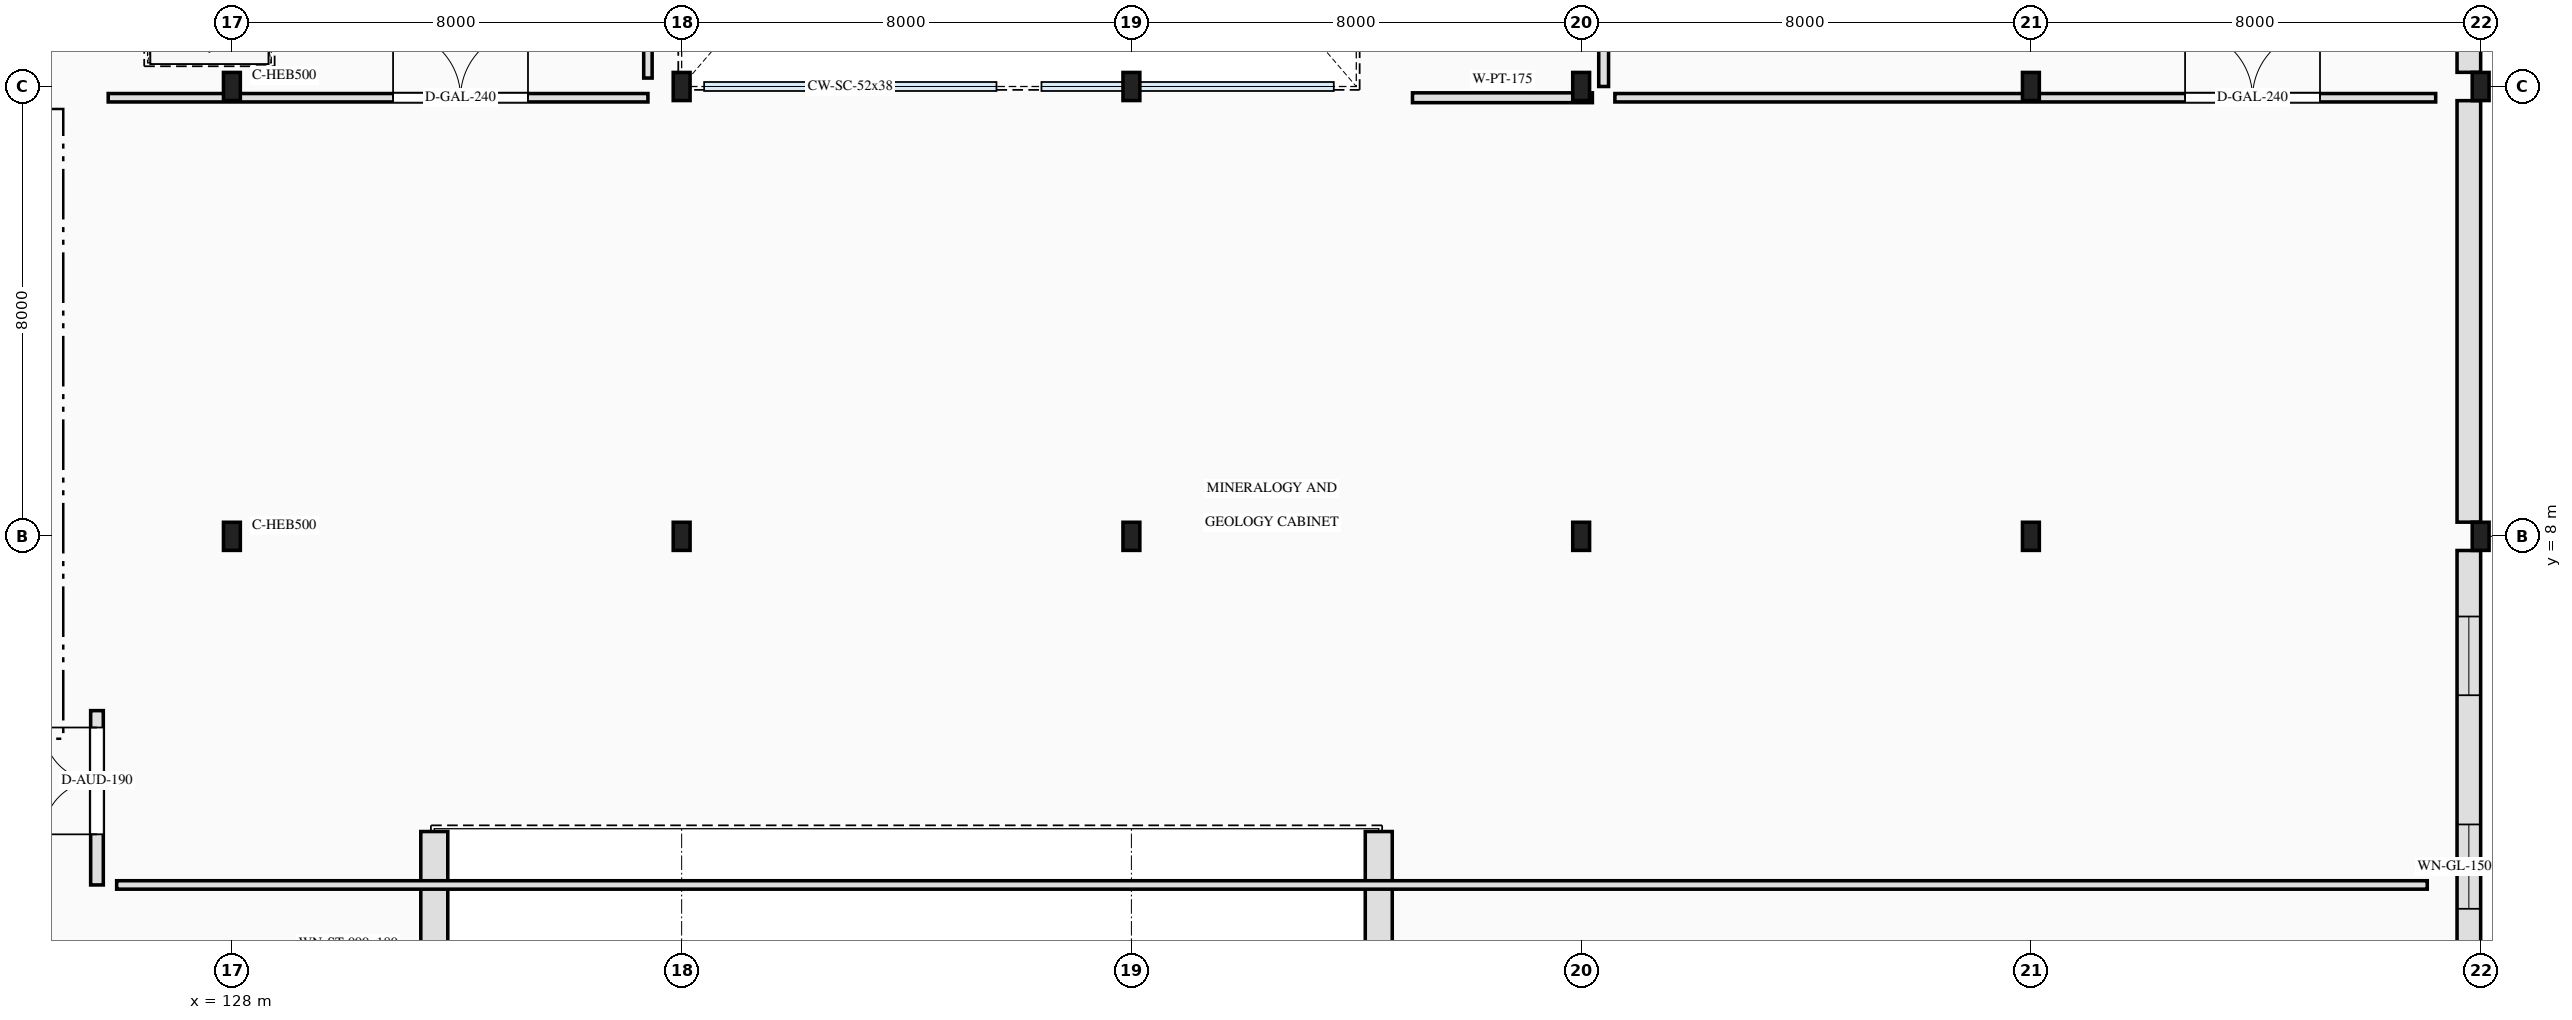
"""IFC4 building model, lengths in metres.
Left out: names, types, materials, properties, quantities, classifications, styles, units other than length and angle.
Written with IfcOpenShell. Run it as: python <this file> out.ifc"""

import sys

from ifc_helpers import new_model, si_unit, direction, frame, frame_2d, origin, origin_2d, place, context, subcontext, project, spatial, rectangle, i_section, extrude, element, fill, save


model = new_model("IFC4")
c1 = context("Model", 3, precision=1e-05, world=origin(), true_north=direction((0.0, 1.0)))
c2 = subcontext(c1, "Body", "Model", "MODEL_VIEW")
j1 = project(units=[si_unit("LENGTHUNIT", "METRE"), si_unit("PLANEANGLEUNIT", "RADIAN")], contexts=[c1])
p1 = place(None, origin())
s1 = spatial("IfcSite", under=j1, at=p1, CompositionType="ELEMENT")
p2 = place(p1, origin())
s2 = spatial("IfcBuilding", under=s1, at=p2, CompositionType="ELEMENT")
p3 = place(p2, frame((0.0, 0.0, 5.4)))
s3 = spatial("IfcBuildingStorey", under=s2, at=p3, CompositionType="ELEMENT", Elevation=5.4)
for number, where, z_axis, x_axis in (
    (1, (128.0, 8.0, 0.0), (0.0, 0.0, 1.0), (1.0, 0.0, 0.0)),
    (2, (128.0, 16.0, 0.0), (0.0, 0.0, 1.0), (1.0, 0.0, 0.0)),
    (3, (136.0, 8.0, 0.0), (0.0, 0.0, 1.0), (1.0, 0.0, 0.0)),
    (4, (136.0, 16.0, 0.0), (0.0, 0.0, 1.0), (1.0, 0.0, 0.0)),
    (5, (144.0, 8.0, 0.0), (0.0, 0.0, 1.0), (1.0, 0.0, 0.0)),
    (6, (144.0, 16.0, 0.0), (0.0, 0.0, 1.0), (1.0, 0.0, 0.0)),
    (7, (152.0, 8.0, 0.0), (0.0, 0.0, 1.0), (1.0, 0.0, 0.0)),
    (8, (152.0, 16.0, 0.0), (0.0, 0.0, 1.0), (1.0, 0.0, 0.0)),
    (9, (160.0, 8.0, 0.0), (0.0, 0.0, 1.0), (1.0, 0.0, 0.0)),
    (10, (160.0, 16.0, 0.0), (0.0, 0.0, 1.0), (1.0, 0.0, 0.0)),
    (11, (168.0, 8.0, 0.0), (0.0, 0.0, 1.0), (1.0, 0.0, 0.0)),
    (12, (168.0, 16.0, 0.0), (0.0, 0.0, 1.0), (1.0, 0.0, 0.0)),
):
    element("IfcColumn", number, at=place(p3, frame(where, z_axis=z_axis, x_axis=x_axis)), inside=s3, PredefinedType="COLUMN", context=c2, shape_type="SweptSolid", body=[
        extrude(i_section(OverallWidth=0.3, OverallDepth=0.5, WebThickness=0.014, FlangeThickness=0.028, FilletRadius=0.027, at=origin_2d()), origin(), (0.0, 0.0, 1.0), 4.2),
    ])
for number, where, z_axis, x_axis in (
    (13, (131.6, 0.24, 0.0), (0.0, 0.0, 1.0), (0.0, 1.0, 0.0)),
    (14, (148.4, 0.24, 0.0), (0.0, 0.0, 1.0), (0.0, 1.0, 0.0)),
):
    element("IfcWall", number, at=place(p3, frame(where, z_axis=z_axis, x_axis=x_axis)), inside=s3, PredefinedType="SOLIDWALL", context=c2, shape_type="SweptSolid", body=[
        extrude(rectangle(XDim=2.51, YDim=0.48, at=frame_2d((1.255, 0.0))), origin(), (0.0, 0.0, 1.0), 3.96),
    ])
p4 = place(p3, frame((167.79, 7.748, 0.0), z_axis=(0.0, 0.0, 1.0), x_axis=(0.0, -1.0, 0.0)))
e15 = element("IfcWall", 15, at=p4, inside=s3, PredefinedType="SOLIDWALL", context=c2, shape_type="SweptSolid", body=[
    extrude(rectangle(XDim=7.496, YDim=0.42, at=frame_2d((3.748, 0.0))), origin(), (0.0, 0.0, 1.0), 3.415),
])
p5 = place(p4, frame((1.174, 0.0, 0.85)))
e16 = element("IfcOpeningElement", 16, at=p5, cuts=e15, PredefinedType="OPENING", context=c2, shape_type="SweptSolid", body=[
    extrude(rectangle(XDim=1.4, YDim=1.6, at=frame_2d((0.7, 0.8))), frame((0.0, 0.22, 0.0), z_axis=(0.0, -1.0, 0.0), x_axis=(1.0, 0.0, 0.0)), (0.0, 0.0, 1.0), 0.44),
])
p6 = place(p4, frame((4.872, 0.0, 0.85)))
e17 = element("IfcOpeningElement", 17, at=p6, cuts=e15, PredefinedType="OPENING", context=c2, shape_type="SweptSolid", body=[
    extrude(rectangle(XDim=1.5, YDim=2.4, at=frame_2d((0.75, 1.2))), frame((0.0, 0.22, 0.0), z_axis=(0.0, -1.0, 0.0), x_axis=(1.0, 0.0, 0.0)), (0.0, 0.0, 1.0), 0.44),
])
p7 = place(p3, frame((167.79, 15.748, 0.0), z_axis=(0.0, 0.0, 1.0), x_axis=(0.0, -1.0, 0.0)))
e18 = element("IfcWall", 18, at=p7, inside=s3, PredefinedType="SOLIDWALL", context=c2, shape_type="SweptSolid", body=[
    extrude(rectangle(XDim=7.496, YDim=0.42, at=frame_2d((3.748, 0.0))), origin(), (0.0, 0.0, 1.0), 3.415),
])
p8 = place(p3, frame((167.79, 23.748, 0.0), z_axis=(0.0, 0.0, 1.0), x_axis=(0.0, -1.0, 0.0)))
e19 = element("IfcWall", 19, at=p8, inside=s3, PredefinedType="SOLIDWALL", context=c2, shape_type="SweptSolid", body=[
    extrude(rectangle(XDim=7.496, YDim=0.42, at=frame_2d((3.748, 0.0))), origin(), (0.0, 0.0, 1.0), 3.415),
])
p9 = place(p8, frame((1.174, 0.0, 0.85)))
e20 = element("IfcOpeningElement", 20, at=p9, cuts=e19, PredefinedType="OPENING", context=c2, shape_type="SweptSolid", body=[
    extrude(rectangle(XDim=1.4, YDim=1.6, at=frame_2d((0.7, 0.8))), frame((0.0, 0.22, 0.0), z_axis=(0.0, -1.0, 0.0), x_axis=(1.0, 0.0, 0.0)), (0.0, 0.0, 1.0), 0.44),
])
p10 = place(p8, frame((4.872, 0.0, 0.85)))
e21 = element("IfcOpeningElement", 21, at=p10, cuts=e19, PredefinedType="OPENING", context=c2, shape_type="SweptSolid", body=[
    extrude(rectangle(XDim=1.5, YDim=2.4, at=frame_2d((0.75, 1.2))), frame((0.0, 0.22, 0.0), z_axis=(0.0, -1.0, 0.0), x_axis=(1.0, 0.0, 0.0)), (0.0, 0.0, 1.0), 0.44),
])
p11 = place(p3, frame((125.6, 1.8, 0.0), z_axis=(0.0, 0.0, 1.0), x_axis=(0.0, 1.0, 0.0)))
e22 = element("IfcWall", 22, at=p11, inside=s3, PredefinedType="SOLIDWALL", context=c2, shape_type="SweptSolid", body=[
    extrude(rectangle(XDim=3.1, YDim=0.225, at=frame_2d((1.55, 0.0))), origin(), (0.0, 0.0, 1.0), 3.92),
])
p12 = place(p11, frame((0.9, 0.0, 0.0)))
e23 = element("IfcOpeningElement", 23, at=p12, cuts=e22, PredefinedType="OPENING", context=c2, shape_type="SweptSolid", body=[
    extrude(rectangle(XDim=1.9, YDim=2.35, at=frame_2d((0.95, 1.175))), frame((0.0, 0.123, 0.0), z_axis=(0.0, -1.0, 0.0), x_axis=(1.0, 0.0, 0.0)), (0.0, 0.0, 1.0), 0.245),
])
p13 = place(p3, frame((149.0, 15.8, 0.0), z_axis=(0.0, 0.0, 1.0), x_axis=(1.0, 0.0, 0.0)))
e24 = element("IfcWall", 24, at=p13, inside=s3, PredefinedType="PARTITIONING", context=c2, shape_type="SweptSolid", body=[
    extrude(rectangle(XDim=3.2, YDim=0.175, at=frame_2d((1.6, 0.0))), origin(), (0.0, 0.0, 1.0), 3.38),
])
p14 = place(p3, frame((152.4, 16.0, 0.0), z_axis=(0.0, 0.0, 1.0), x_axis=(0.0, 1.0, 0.0)))
e25 = element("IfcWall", 25, at=p14, inside=s3, PredefinedType="PARTITIONING", context=c2, shape_type="SweptSolid", body=[
    extrude(rectangle(XDim=16.6, YDim=0.175, at=frame_2d((8.3, 0.0))), origin(), (0.0, 0.0, 1.0), 3.92),
])
p15 = place(p14, frame((3.12, 0.0, 0.0)))
e26 = element("IfcOpeningElement", 26, at=p15, cuts=e25, PredefinedType="OPENING", context=c2, shape_type="SweptSolid", body=[
    extrude(rectangle(XDim=1.9, YDim=2.35, at=frame_2d((0.95, 1.175))), frame((0.0, 0.097, 0.0), z_axis=(0.0, -1.0, 0.0), x_axis=(1.0, 0.0, 0.0)), (0.0, 0.0, 1.0), 0.195),
])
p16 = place(p3, frame((152.6, 15.8, 0.0), z_axis=(0.0, 0.0, 1.0), x_axis=(1.0, 0.0, 0.0)))
e27 = element("IfcWall", 27, at=p16, inside=s3, PredefinedType="PARTITIONING", context=c2, shape_type="SweptSolid", body=[
    extrude(rectangle(XDim=14.6, YDim=0.15, at=frame_2d((7.3, 0.0))), origin(), (0.0, 0.0, 1.0), 3.38),
])
p17 = place(p16, frame((10.142, 0.0, 0.0)))
e28 = element("IfcOpeningElement", 28, at=p17, cuts=e27, PredefinedType="OPENING", context=c2, shape_type="SweptSolid", body=[
    extrude(rectangle(XDim=2.4, YDim=2.75, at=frame_2d((1.2, 1.375))), frame((0.0, 0.085, 0.0), z_axis=(0.0, -1.0, 0.0), x_axis=(1.0, 0.0, 0.0)), (0.0, 0.0, 1.0), 0.17),
])
p18 = place(p3, frame((125.8, 15.8, 0.0), z_axis=(0.0, 0.0, 1.0), x_axis=(1.0, 0.0, 0.0)))
e29 = element("IfcWall", 29, at=p18, inside=s3, PredefinedType="PARTITIONING", context=c2, shape_type="SweptSolid", body=[
    extrude(rectangle(XDim=9.6, YDim=0.15, at=frame_2d((4.8, 0.0))), origin(), (0.0, 0.0, 1.0), 3.38),
])
p19 = place(p18, frame((5.067, 0.0, 0.0)))
e30 = element("IfcOpeningElement", 30, at=p19, cuts=e29, PredefinedType="OPENING", context=c2, shape_type="SweptSolid", body=[
    extrude(rectangle(XDim=2.4, YDim=2.75, at=frame_2d((1.2, 1.375))), frame((0.0, 0.085, 0.0), z_axis=(0.0, -1.0, 0.0), x_axis=(1.0, 0.0, 0.0)), (0.0, 0.0, 1.0), 0.17),
])
p20 = place(p3, frame((125.95, 1.8, 0.0), z_axis=(0.0, 0.0, 1.0), x_axis=(1.0, 0.0, 0.0)))
e31 = element("IfcWall", 31, at=p20, inside=s3, PredefinedType="PARTITIONING", context=c2, shape_type="SweptSolid", body=[
    extrude(rectangle(XDim=41.1, YDim=0.15, at=frame_2d((20.55, 0.0))), origin(), (0.0, 0.0, 1.0), 3.92),
])
p21 = place(p3, frame((135.4, 16.15, 0.0), z_axis=(0.0, 0.0, 1.0), x_axis=(0.0, 1.0, 0.0)))
e32 = element("IfcWall", 32, at=p21, inside=s3, PredefinedType="PARTITIONING", context=c2, shape_type="SweptSolid", body=[
    extrude(rectangle(XDim=15.1, YDim=0.15, at=frame_2d((7.55, 0.0))), origin(), (0.0, 0.0, 1.0), 3.92),
])
p22 = place(p5, origin())
e33 = element("IfcWindow", 33, at=p22, inside=s3, PartitioningType="SINGLE_PANEL", PredefinedType="WINDOW", context=c2, shape_type="SweptSolid", body=[
    extrude(rectangle(XDim=1.4, YDim=1.6, at=frame_2d((0.7, 0.8))), frame((0.0, 0.03, 0.0), z_axis=(0.0, -1.0, 0.0), x_axis=(1.0, 0.0, 0.0)), (0.0, 0.0, 1.0), 0.06),
])
fill(e16, e33)
p23 = place(p6, origin())
e34 = element("IfcWindow", 34, at=p23, inside=s3, PartitioningType="SINGLE_PANEL", PredefinedType="WINDOW", context=c2, shape_type="SweptSolid", body=[
    extrude(rectangle(XDim=1.5, YDim=2.4, at=frame_2d((0.75, 1.2))), frame((0.0, 0.03, 0.0), z_axis=(0.0, -1.0, 0.0), x_axis=(1.0, 0.0, 0.0)), (0.0, 0.0, 1.0), 0.06),
])
fill(e17, e34)
p24 = place(p12, origin())
e35 = element("IfcDoor", 35, at=p24, inside=s3, OperationType="DOUBLE_DOOR_SINGLE_SWING", PredefinedType="DOOR", context=c2, shape_type="SweptSolid", body=[
    extrude(rectangle(XDim=1.9, YDim=2.35, at=frame_2d((0.95, 1.175))), frame((0.0, 0.025, 0.0), z_axis=(0.0, -1.0, 0.0), x_axis=(1.0, 0.0, 0.0)), (0.0, 0.0, 1.0), 0.05),
])
fill(e23, e35)
p25 = place(p17, origin())
e36 = element("IfcDoor", 36, at=p25, inside=s3, OperationType="DOUBLE_DOOR_DOUBLE_SWING", PredefinedType="DOOR", context=c2, shape_type="SweptSolid", body=[
    extrude(rectangle(XDim=2.4, YDim=2.75, at=frame_2d((1.2, 1.375))), frame((0.0, 0.025, 0.0), z_axis=(0.0, -1.0, 0.0), x_axis=(1.0, 0.0, 0.0)), (0.0, 0.0, 1.0), 0.05),
])
fill(e28, e36)
p26 = place(p19, origin())
e37 = element("IfcDoor", 37, at=p26, inside=s3, OperationType="DOUBLE_DOOR_DOUBLE_SWING", PredefinedType="DOOR", context=c2, shape_type="SweptSolid", body=[
    extrude(rectangle(XDim=2.4, YDim=2.75, at=frame_2d((1.2, 1.375))), frame((0.0, 0.025, 0.0), z_axis=(0.0, -1.0, 0.0), x_axis=(1.0, 0.0, 0.0)), (0.0, 0.0, 1.0), 0.05),
])
fill(e30, e37)
save(model, sys.argv[1])
